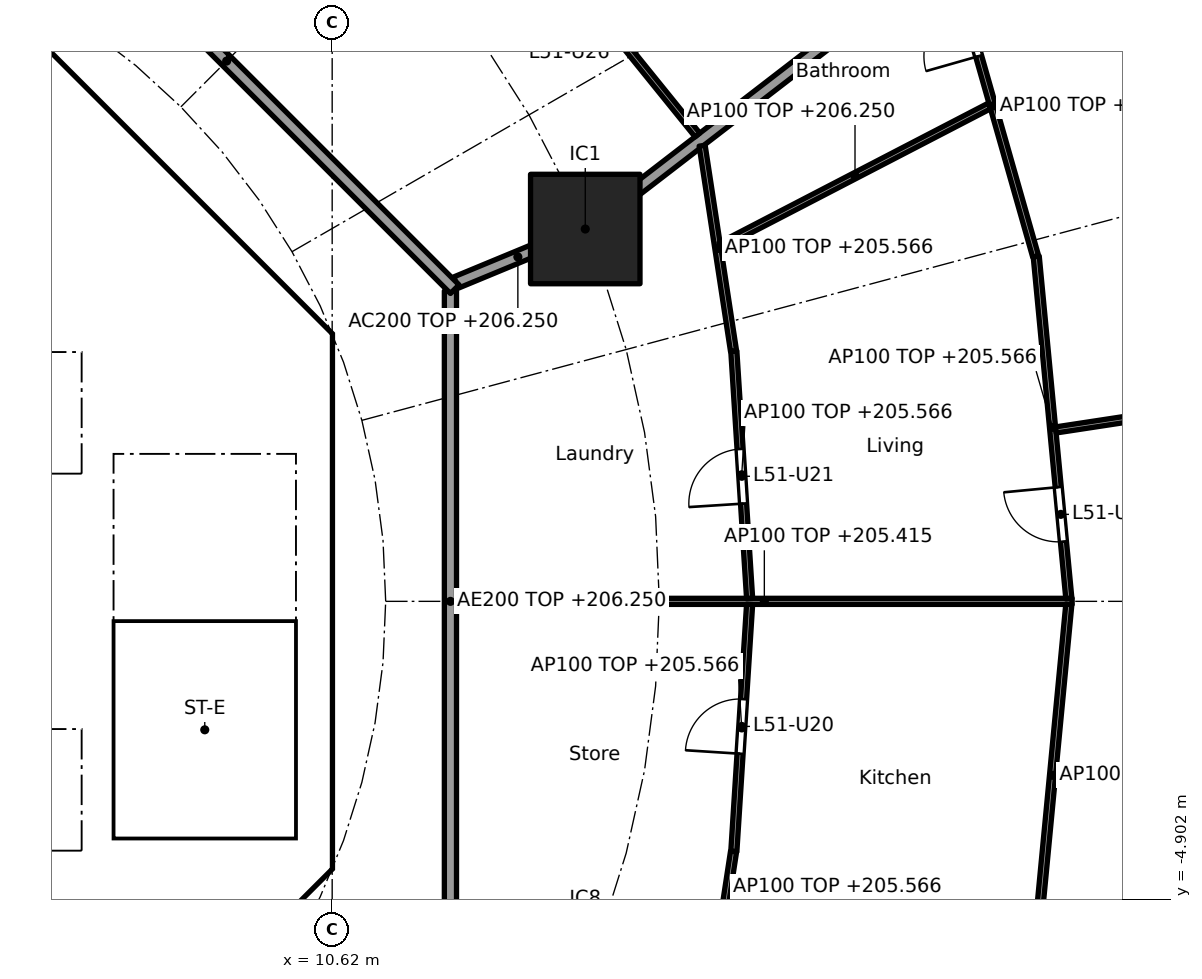
"""IFC4 building model, lengths in metres.
Left out: names, types, materials, properties, quantities, classifications, styles, units other than length and angle.
Written with IfcOpenShell. Run it as: python <this file> out.ifc"""

import sys

from ifc_helpers import new_model, si_unit, direction, frame, frame_2d, origin, origin_2d, place, context, subcontext, project, spatial, polyline, rectangle, outline, extrude, element, fill, save


model = new_model("IFC4")
c1 = context("Model", 3, precision=1e-05, world=origin(), true_north=direction((0.0, 1.0)))
c2 = subcontext(c1, "Body", "Model", "MODEL_VIEW")
j1 = project(units=[si_unit("LENGTHUNIT", "METRE"), si_unit("PLANEANGLEUNIT", "RADIAN")], contexts=[c1])
p1 = place(None, origin())
s1 = spatial("IfcSite", under=j1, at=p1, CompositionType="ELEMENT")
p2 = place(p1, origin())
s2 = spatial("IfcBuilding", under=s1, at=p2, CompositionType="ELEMENT")
p3 = place(p2, frame((0.0, 0.0, 202.9)))
s3 = spatial("IfcBuildingStorey", under=s2, at=p3, CompositionType="ELEMENT", Elevation=202.9)
p4 = place(p3, frame((14.782, 6.123, 0.0), z_axis=(0.0, 0.0, 1.0), x_axis=(1.0, 0.0, 0.0)))
e1 = element("IfcColumn", 1, at=p4, inside=s3, PredefinedType="COLUMN", context=c2, shape_type="SweptSolid", body=[
    extrude(rectangle(XDim=1.8, YDim=1.8, at=origin_2d()), origin(), (0.0, 0.0, 1.0), 3.7),
])
p5 = place(p3, frame((9.988, 4.613, 0.0), z_axis=(0.0, 0.0, 1.0), x_axis=(-0.707106781187, 0.707106781187, 0.0)))
e2 = element("IfcWall", 2, at=p5, inside=s3, PredefinedType="SHEAR", context=c2, shape_type="SweptSolid", body=[
    extrude(rectangle(XDim=7.602, YDim=0.6, at=frame_2d((3.801, 0.0))), origin(), (0.0, 0.0, 1.0), 3.35),
])
p6 = place(p5, frame((3.201, 0.0, 0.0)))
e3 = element("IfcOpeningElement", 3, at=p6, cuts=e2, PredefinedType="OPENING", context=c2, shape_type="SweptSolid", body=[
    extrude(rectangle(XDim=1.2, YDim=2.1, at=frame_2d((0.6, 1.05))), frame((0.0, 0.31, 0.0), z_axis=(0.0, -1.0, 0.0), x_axis=(1.0, 0.0, 0.0)), (0.0, 0.0, 1.0), 0.62),
])
p7 = place(p3, frame((4.613, -9.988, 0.0), z_axis=(0.0, 0.0, 1.0), x_axis=(0.707106781187, 0.707106781187, 0.0)))
e4 = element("IfcWall", 4, at=p7, inside=s3, PredefinedType="SHEAR", context=c2, shape_type="SweptSolid", body=[
    extrude(rectangle(XDim=7.602, YDim=0.6, at=frame_2d((3.801, 0.0))), origin(), (0.0, 0.0, 1.0), 3.35),
])
p8 = place(p7, frame((3.201, 0.0, 0.0)))
e5 = element("IfcOpeningElement", 5, at=p8, cuts=e4, PredefinedType="OPENING", context=c2, shape_type="SweptSolid", body=[
    extrude(rectangle(XDim=1.2, YDim=2.1, at=frame_2d((0.6, 1.05))), frame((0.0, 0.31, 0.0), z_axis=(0.0, -1.0, 0.0), x_axis=(1.0, 0.0, 0.0)), (0.0, 0.0, 1.0), 0.62),
])
p9 = place(p3, frame((-6.7, 2.0, 0.0), z_axis=(0.0, 0.0, 1.0), x_axis=(1.0, 0.0, 0.0)))
e6 = element("IfcWall", 6, at=p9, inside=s3, PredefinedType="SOLIDWALL", context=c2, shape_type="SweptSolid", body=[
    extrude(rectangle(XDim=13.4, YDim=0.2, at=frame_2d((6.7, 0.0))), origin(), (0.0, 0.0, 1.0), 3.35),
])
p10 = place(p9, frame((7.25, 0.0, 0.0)))
e7 = element("IfcOpeningElement", 7, at=p10, cuts=e6, PredefinedType="OPENING", context=c2, shape_type="SweptSolid", body=[
    extrude(rectangle(XDim=1.1, YDim=2.1, at=frame_2d((0.55, 1.05))), frame((0.0, 0.11, 0.0), z_axis=(0.0, -1.0, 0.0), x_axis=(1.0, 0.0, 0.0)), (0.0, 0.0, 1.0), 0.22),
])
p11 = place(p9, frame((9.45, 0.0, 0.0)))
e8 = element("IfcOpeningElement", 8, at=p11, cuts=e6, PredefinedType="OPENING", context=c2, shape_type="SweptSolid", body=[
    extrude(rectangle(XDim=1.1, YDim=2.1, at=frame_2d((0.55, 1.05))), frame((0.0, 0.11, 0.0), z_axis=(0.0, -1.0, 0.0), x_axis=(1.0, 0.0, 0.0)), (0.0, 0.0, 1.0), 0.22),
])
p12 = place(p9, frame((2.95, 0.0, 0.0)))
e9 = element("IfcOpeningElement", 9, at=p12, cuts=e6, PredefinedType="OPENING", context=c2, shape_type="SweptSolid", body=[
    extrude(rectangle(XDim=0.9, YDim=2.1, at=frame_2d((0.45, 1.05))), frame((0.0, 0.11, 0.0), z_axis=(0.0, -1.0, 0.0), x_axis=(1.0, 0.0, 0.0)), (0.0, 0.0, 1.0), 0.22),
])
p13 = place(p3, frame((6.7, 4.0, 0.0), z_axis=(0.0, 0.0, 1.0), x_axis=(1.0, 0.0, 0.0)))
e10 = element("IfcWall", 10, at=p13, inside=s3, PredefinedType="SOLIDWALL", context=c2, shape_type="SweptSolid", body=[
    extrude(rectangle(XDim=3.325, YDim=0.2, at=frame_2d((1.662, 0.0))), origin(), (0.0, 0.0, 1.0), 3.35),
])
p14 = place(p13, frame((1.25, 0.0, 0.0)))
e11 = element("IfcOpeningElement", 11, at=p14, cuts=e10, PredefinedType="OPENING", context=c2, shape_type="SweptSolid", body=[
    extrude(rectangle(XDim=1.1, YDim=2.1, at=frame_2d((0.55, 1.05))), frame((0.0, 0.11, 0.0), z_axis=(0.0, -1.0, 0.0), x_axis=(1.0, 0.0, 0.0)), (0.0, 0.0, 1.0), 0.22),
])
p15 = place(p3, frame((-6.7, -2.0, 0.0), z_axis=(0.0, 0.0, 1.0), x_axis=(1.0, 0.0, 0.0)))
e12 = element("IfcWall", 12, at=p15, inside=s3, PredefinedType="SOLIDWALL", context=c2, shape_type="SweptSolid", body=[
    extrude(rectangle(XDim=13.4, YDim=0.2, at=frame_2d((6.7, 0.0))), origin(), (0.0, 0.0, 1.0), 3.35),
])
p16 = place(p15, frame((5.05, 0.0, 0.0)))
e13 = element("IfcOpeningElement", 13, at=p16, cuts=e12, PredefinedType="OPENING", context=c2, shape_type="SweptSolid", body=[
    extrude(rectangle(XDim=1.1, YDim=2.1, at=frame_2d((0.55, 1.05))), frame((0.0, 0.11, 0.0), z_axis=(0.0, -1.0, 0.0), x_axis=(1.0, 0.0, 0.0)), (0.0, 0.0, 1.0), 0.22),
])
p17 = place(p15, frame((7.25, 0.0, 0.0)))
e14 = element("IfcOpeningElement", 14, at=p17, cuts=e12, PredefinedType="OPENING", context=c2, shape_type="SweptSolid", body=[
    extrude(rectangle(XDim=1.1, YDim=2.1, at=frame_2d((0.55, 1.05))), frame((0.0, 0.11, 0.0), z_axis=(0.0, -1.0, 0.0), x_axis=(1.0, 0.0, 0.0)), (0.0, 0.0, 1.0), 0.22),
])
p18 = place(p15, frame((0.75, 0.0, 0.0)))
e15 = element("IfcOpeningElement", 15, at=p18, cuts=e12, PredefinedType="OPENING", context=c2, shape_type="SweptSolid", body=[
    extrude(rectangle(XDim=0.9, YDim=2.1, at=frame_2d((0.45, 1.05))), frame((0.0, 0.11, 0.0), z_axis=(0.0, -1.0, 0.0), x_axis=(1.0, 0.0, 0.0)), (0.0, 0.0, 1.0), 0.22),
])
p19 = place(p15, frame((2.95, 0.0, 0.0)))
e16 = element("IfcOpeningElement", 16, at=p19, cuts=e12, PredefinedType="OPENING", context=c2, shape_type="SweptSolid", body=[
    extrude(rectangle(XDim=0.9, YDim=2.1, at=frame_2d((0.45, 1.05))), frame((0.0, 0.11, 0.0), z_axis=(0.0, -1.0, 0.0), x_axis=(1.0, 0.0, 0.0)), (0.0, 0.0, 1.0), 0.22),
])
p20 = place(p3, origin())
e17 = element("IfcWall", 17, at=p20, inside=s3, PredefinedType="SHEAR", context=c2, shape_type="SweptSolid", body=[
    extrude(outline(polyline([(9.776, -4.401), (10.025, -4.152), (10.025, -3.801), (10.025, 4.152), (9.776, 4.401), (10.2, 4.825), (10.625, 4.401), (10.625, -4.401), (10.2, -4.825), (9.776, -4.401)])), origin(), (0.0, 0.0, 1.0), 3.35),
])
p21 = place(p3, origin())
e18 = element("IfcWall", 18, at=p21, inside=s3, PredefinedType="SOLIDWALL", context=c2, shape_type="SweptSolid", body=[
    extrude(outline(polyline([(-6.7, -2.1), (-6.5, -2.1), (-6.5, -4.1), (-4.5, -4.1), (-4.5, -2.1), (-4.3, -2.1), (-4.3, -4.1), (-2.3, -4.1), (-2.3, -2.1), (-2.1, -2.1), (-2.1, -4.1), (-0.1, -4.1), (-0.1, -2.1), (0.1, -2.1), (0.1, -4.1), (2.1, -4.1), (2.1, -2.1), (2.3, -2.1), (2.3, -4.1), (4.3, -4.1), (4.3, -2.1), (4.5, -2.1), (4.5, -4.1), (6.5, -4.1), (6.5, -2.1), (6.7, -2.1), (6.7, -4.3), (-6.7, -4.3), (-6.7, -2.1)])), origin(), (0.0, 0.0, 1.0), 3.35),
])
p22 = place(p3, origin())
e19 = element("IfcWall", 19, at=p22, inside=s3, PredefinedType="SOLIDWALL", context=c2, shape_type="SweptSolid", body=[
    extrude(outline(polyline([(-6.7, 4.3), (6.7, 4.3), (6.7, 2.1), (6.5, 2.1), (6.5, 4.1), (4.5, 4.1), (4.5, 2.1), (4.3, 2.1), (4.3, 4.1), (2.3, 4.1), (2.3, 2.1), (2.1, 2.1), (2.1, 4.1), (0.1, 4.1), (0.1, 2.1), (-0.1, 2.1), (-0.1, 4.1), (-6.5, 4.1), (-6.5, 2.1), (-6.7, 2.1), (-6.7, 4.3)])), origin(), (0.0, 0.0, 1.0), 3.35),
])
p23 = place(p3, origin())
e20 = element("IfcWall", 20, at=p23, inside=s3, PredefinedType="SOLIDWALL", context=c2, shape_type="SweptSolid", body=[
    extrude(outline(polyline([(7.025, -3.9), (6.7, -3.9), (6.7, 3.9), (7.025, 3.9), (7.025, -3.9)])), origin(), (0.0, 0.0, 1.0), 3.35),
])
p24 = place(p3, origin())
e21 = element("IfcWall", 21, at=p24, inside=s3, PredefinedType="SOLIDWALL", context=c2, shape_type="SweptSolid", body=[
    extrude(outline(polyline([(10.025, -4.1), (6.7, -4.1), (6.7, -3.9), (10.025, -3.9), (10.025, -4.1)])), origin(), (0.0, 0.0, 1.0), 3.35),
])
p25 = place(p3, frame((12.657, 5.243, 0.0), z_axis=(0.0, 0.0, 1.0), x_axis=(0.92383017907, 0.382802560388, 0.0)))
e22 = element("IfcWall", 22, at=p25, inside=s3, PredefinedType="PARTITIONING", context=c2, shape_type="SweptSolid", body=[
    extrude(rectangle(XDim=2.2, YDim=0.2, at=frame_2d((1.1, 0.0))), origin(), (0.0, 0.0, 1.0), 3.35),
])
p26 = place(p3, frame((14.822, 6.154, 0.0), z_axis=(0.0, 0.0, 1.0), x_axis=(0.792203056092, 0.610257583254, 0.0)))
e23 = element("IfcWall", 23, at=p26, inside=s3, PredefinedType="PARTITIONING", context=c2, shape_type="SweptSolid", body=[
    extrude(rectangle(XDim=12.533, YDim=0.2, at=frame_2d((6.266, 0.0))), origin(), (0.0, 0.0, 1.0), 2.666),
])
p27 = place(p3, frame((12.565, -5.104, 0.0), z_axis=(0.0, 0.0, 1.0), x_axis=(0.0, 1.0, 0.0)))
e24 = element("IfcWall", 24, at=p27, inside=s3, PredefinedType="PARTITIONING", context=c2, shape_type="SweptSolid", body=[
    extrude(rectangle(XDim=10.209, YDim=0.2, at=frame_2d((5.104, 0.0))), origin(), (0.0, 0.0, 1.0), 3.35),
])
p28 = place(p3, frame((12.635, 5.134, 0.0), z_axis=(0.0, 0.0, 1.0), x_axis=(-0.707106781187, 0.707106781187, 0.0)))
e25 = element("IfcWall", 25, at=p28, inside=s3, PredefinedType="PARTITIONING", context=c2, shape_type="SweptSolid", body=[
    extrude(rectangle(XDim=10.609, YDim=0.2, at=frame_2d((5.305, 0.0))), origin(), (0.0, 0.0, 1.0), 3.35),
])
p29 = place(p28, frame((8.274, 0.0, 0.0)))
e26 = element("IfcOpeningElement", 26, at=p29, cuts=e25, PredefinedType="OPENING", context=c2, shape_type="SweptSolid", body=[
    extrude(rectangle(XDim=1.0, YDim=2.1, at=frame_2d((0.5, 1.05))), frame((0.0, 0.11, 0.0), z_axis=(0.0, -1.0, 0.0), x_axis=(1.0, 0.0, 0.0)), (0.0, 0.0, 1.0), 0.22),
])
p30 = place(p3, frame((12.665, 0.0, 0.0), z_axis=(0.0, 0.0, 1.0), x_axis=(1.0, 0.0, 0.0)))
e27 = element("IfcWall", 27, at=p30, inside=s3, PredefinedType="PARTITIONING", context=c2, shape_type="SweptSolid", body=[
    extrude(rectangle(XDim=10.124, YDim=0.1, at=frame_2d((5.062, 0.0))), origin(), (0.0, 0.0, 1.0), 2.515),
])
p31 = place(p3, frame((17.485, 0.05, 0.0), z_axis=(0.0, 0.0, 1.0), x_axis=(-0.063673473968, 0.997970785501, 0.0)))
e28 = element("IfcWall", 28, at=p31, inside=s3, PredefinedType="PARTITIONING", context=c2, shape_type="SweptSolid", body=[
    extrude(rectangle(XDim=4.072, YDim=0.1, at=frame_2d((2.036, 0.0))), origin(), (0.0, 0.0, 1.0), 2.666),
])
p32 = place(p31, frame((1.561, 0.0, 0.0)))
e29 = element("IfcOpeningElement", 29, at=p32, cuts=e28, PredefinedType="OPENING", context=c2, shape_type="SweptSolid", body=[
    extrude(rectangle(XDim=0.9, YDim=2.1, at=frame_2d((0.45, 1.05))), frame((0.0, 0.06, 0.0), z_axis=(0.0, -1.0, 0.0), x_axis=(1.0, 0.0, 0.0)), (0.0, 0.0, 1.0), 0.12),
])
p33 = place(p3, frame((17.485, -0.05, 0.0), z_axis=(0.0, 0.0, 1.0), x_axis=(-0.063673473968, -0.997970785501, 0.0)))
e30 = element("IfcWall", 30, at=p33, inside=s3, PredefinedType="PARTITIONING", context=c2, shape_type="SweptSolid", body=[
    extrude(rectangle(XDim=4.072, YDim=0.1, at=frame_2d((2.036, 0.0))), origin(), (0.0, 0.0, 1.0), 2.666),
])
p34 = place(p33, frame((1.561, 0.0, 0.0)))
e31 = element("IfcOpeningElement", 31, at=p34, cuts=e30, PredefinedType="OPENING", context=c2, shape_type="SweptSolid", body=[
    extrude(rectangle(XDim=0.9, YDim=2.1, at=frame_2d((0.45, 1.05))), frame((0.0, 0.06, 0.0), z_axis=(0.0, -1.0, 0.0), x_axis=(1.0, 0.0, 0.0)), (0.0, 0.0, 1.0), 0.12),
])
p35 = place(p3, frame((22.734, 0.05, 0.0), z_axis=(0.0, 0.0, 1.0), x_axis=(-0.0949274088, 0.995484197292, 0.0)))
e32 = element("IfcWall", 32, at=p35, inside=s3, PredefinedType="PARTITIONING", context=c2, shape_type="SweptSolid", body=[
    extrude(rectangle(XDim=5.648, YDim=0.1, at=frame_2d((2.824, 0.0))), origin(), (0.0, 0.0, 1.0), 2.666),
])
p36 = place(p35, frame((0.937, 0.0, 0.0)))
e33 = element("IfcOpeningElement", 33, at=p36, cuts=e32, PredefinedType="OPENING", context=c2, shape_type="SweptSolid", body=[
    extrude(rectangle(XDim=0.9, YDim=2.1, at=frame_2d((0.45, 1.05))), frame((0.0, 0.06, 0.0), z_axis=(0.0, -1.0, 0.0), x_axis=(1.0, 0.0, 0.0)), (0.0, 0.0, 1.0), 0.12),
])
p37 = place(p3, frame((22.734, -0.05, 0.0), z_axis=(0.0, 0.0, 1.0), x_axis=(-0.0949274088, -0.995484197292, 0.0)))
e34 = element("IfcWall", 34, at=p37, inside=s3, PredefinedType="PARTITIONING", context=c2, shape_type="SweptSolid", body=[
    extrude(rectangle(XDim=5.648, YDim=0.1, at=frame_2d((2.824, 0.0))), origin(), (0.0, 0.0, 1.0), 2.666),
])
p38 = place(p3, frame((22.521, 2.819, 0.0), z_axis=(0.0, 0.0, 1.0), x_axis=(0.988590363863, 0.150628989499, 0.0)))
e35 = element("IfcWall", 35, at=p38, inside=s3, PredefinedType="PARTITIONING", context=c2, shape_type="SweptSolid", body=[
    extrude(rectangle(XDim=6.269, YDim=0.1, at=frame_2d((3.135, 0.0))), origin(), (0.0, 0.0, 1.0), 2.747),
])
p39 = place(p38, frame((2.685, 0.0, 0.0)))
e36 = element("IfcOpeningElement", 36, at=p39, cuts=e35, PredefinedType="OPENING", context=c2, shape_type="SweptSolid", body=[
    extrude(rectangle(XDim=0.9, YDim=2.1, at=frame_2d((0.45, 1.05))), frame((0.0, 0.06, 0.0), z_axis=(0.0, -1.0, 0.0), x_axis=(1.0, 0.0, 0.0)), (0.0, 0.0, 1.0), 0.12),
])
p40 = place(p3, frame((17.221, 4.113, 0.0), z_axis=(0.0, 0.0, 1.0), x_axis=(-0.1510806336, 0.988521442434, 0.0)))
e37 = element("IfcWall", 37, at=p40, inside=s3, PredefinedType="PARTITIONING", context=c2, shape_type="SweptSolid", body=[
    extrude(rectangle(XDim=3.419, YDim=0.1, at=frame_2d((1.71, 0.0))), origin(), (0.0, 0.0, 1.0), 2.666),
])
p41 = place(p3, frame((22.189, 5.67, 0.0), z_axis=(0.0, 0.0, 1.0), x_axis=(-0.273819702124, 0.961781040949, 0.0)))
e38 = element("IfcWall", 38, at=p41, inside=s3, PredefinedType="PARTITIONING", context=c2, shape_type="SweptSolid", body=[
    extrude(rectangle(XDim=5.152, YDim=0.1, at=frame_2d((2.576, 0.0))), origin(), (0.0, 0.0, 1.0), 2.666),
])
p42 = place(p41, frame((3.426, 0.0, 0.0)))
e39 = element("IfcOpeningElement", 39, at=p42, cuts=e38, PredefinedType="OPENING", context=c2, shape_type="SweptSolid", body=[
    extrude(rectangle(XDim=0.9, YDim=2.1, at=frame_2d((0.45, 1.05))), frame((0.0, 0.06, 0.0), z_axis=(0.0, -1.0, 0.0), x_axis=(1.0, 0.0, 0.0)), (0.0, 0.0, 1.0), 0.12),
])
p43 = place(p3, frame((17.003, 5.851, 0.0), z_axis=(0.0, 0.0, 1.0), x_axis=(0.887654549419, 0.460509935719, 0.0)))
e40 = element("IfcWall", 40, at=p43, inside=s3, PredefinedType="PARTITIONING", context=c2, shape_type="SweptSolid", body=[
    extrude(rectangle(XDim=4.99, YDim=0.1, at=frame_2d((2.495, 0.0))), origin(), (0.0, 0.0, 1.0), 3.35),
])
p44 = place(p3, frame((16.626, 7.67, 0.0), z_axis=(0.0, 0.0, 1.0), x_axis=(-0.628764602857, 0.777595700987, 0.0)))
e41 = element("IfcWall", 41, at=p44, inside=s3, PredefinedType="PARTITIONING", context=c2, shape_type="SweptSolid", body=[
    extrude(rectangle(XDim=4.957, YDim=0.1, at=frame_2d((2.479, 0.0))), origin(), (0.0, 0.0, 1.0), 2.666),
])
p45 = place(p44, frame((2.004, 0.0, 0.0)))
e42 = element("IfcOpeningElement", 42, at=p45, cuts=e41, PredefinedType="OPENING", context=c2, shape_type="SweptSolid", body=[
    extrude(rectangle(XDim=0.9, YDim=2.1, at=frame_2d((0.45, 1.05))), frame((0.0, 0.06, 0.0), z_axis=(0.0, -1.0, 0.0), x_axis=(1.0, 0.0, 0.0)), (0.0, 0.0, 1.0), 0.12),
])
p46 = place(p3, frame((16.697, -7.543, 0.0), z_axis=(0.0, 0.0, 1.0), x_axis=(0.151078880423, 0.988521710379, 0.0)))
e43 = element("IfcWall", 43, at=p46, inside=s3, PredefinedType="PARTITIONING", context=c2, shape_type="SweptSolid", body=[
    extrude(rectangle(XDim=3.469, YDim=0.1, at=frame_2d((1.735, 0.0))), origin(), (0.0, 0.0, 1.0), 2.666),
])
p47 = place(p14, frame((1.1, 0.0, 0.0), x_axis=(-1.0, 0.0, 0.0)))
e44 = element("IfcDoor", 44, at=p47, inside=s3, OperationType="SINGLE_SWING_RIGHT", PredefinedType="DOOR", context=c2, shape_type="SweptSolid", body=[
    extrude(rectangle(XDim=1.1, YDim=2.1, at=frame_2d((0.55, 1.05))), frame((0.0, 0.025, 0.0), z_axis=(0.0, -1.0, 0.0), x_axis=(1.0, 0.0, 0.0)), (0.0, 0.0, 1.0), 0.05),
])
fill(e11, e44)
p48 = place(p6, origin())
e45 = element("IfcDoor", 45, at=p48, inside=s3, OperationType="SINGLE_SWING_RIGHT", PredefinedType="DOOR", context=c2, shape_type="SweptSolid", body=[
    extrude(rectangle(XDim=1.2, YDim=2.1, at=frame_2d((0.6, 1.05))), frame((0.0, 0.025, 0.0), z_axis=(0.0, -1.0, 0.0), x_axis=(1.0, 0.0, 0.0)), (0.0, 0.0, 1.0), 0.05),
])
fill(e3, e45)
p49 = place(p36, origin())
e46 = element("IfcDoor", 46, at=p49, inside=s3, OperationType="SINGLE_SWING_RIGHT", PredefinedType="DOOR", context=c2, shape_type="SweptSolid", body=[
    extrude(rectangle(XDim=0.9, YDim=2.1, at=frame_2d((0.45, 1.05))), frame((0.0, 0.025, 0.0), z_axis=(0.0, -1.0, 0.0), x_axis=(1.0, 0.0, 0.0)), (0.0, 0.0, 1.0), 0.05),
])
fill(e33, e46)
p50 = place(p42, origin())
e47 = element("IfcDoor", 47, at=p50, inside=s3, OperationType="SINGLE_SWING_LEFT", PredefinedType="DOOR", context=c2, shape_type="SweptSolid", body=[
    extrude(rectangle(XDim=0.9, YDim=2.1, at=frame_2d((0.45, 1.05))), frame((0.0, 0.025, 0.0), z_axis=(0.0, -1.0, 0.0), x_axis=(1.0, 0.0, 0.0)), (0.0, 0.0, 1.0), 0.05),
])
fill(e39, e47)
p51 = place(p34, frame((0.9, 0.0, 0.0), x_axis=(-1.0, 0.0, 0.0)))
e48 = element("IfcDoor", 48, at=p51, inside=s3, OperationType="SINGLE_SWING_LEFT", PredefinedType="DOOR", context=c2, shape_type="SweptSolid", body=[
    extrude(rectangle(XDim=0.9, YDim=2.1, at=frame_2d((0.45, 1.05))), frame((0.0, 0.025, 0.0), z_axis=(0.0, -1.0, 0.0), x_axis=(1.0, 0.0, 0.0)), (0.0, 0.0, 1.0), 0.05),
])
fill(e31, e48)
p52 = place(p32, origin())
e49 = element("IfcDoor", 49, at=p52, inside=s3, OperationType="SINGLE_SWING_LEFT", PredefinedType="DOOR", context=c2, shape_type="SweptSolid", body=[
    extrude(rectangle(XDim=0.9, YDim=2.1, at=frame_2d((0.45, 1.05))), frame((0.0, 0.025, 0.0), z_axis=(0.0, -1.0, 0.0), x_axis=(1.0, 0.0, 0.0)), (0.0, 0.0, 1.0), 0.05),
])
fill(e29, e49)
save(model, sys.argv[1])
